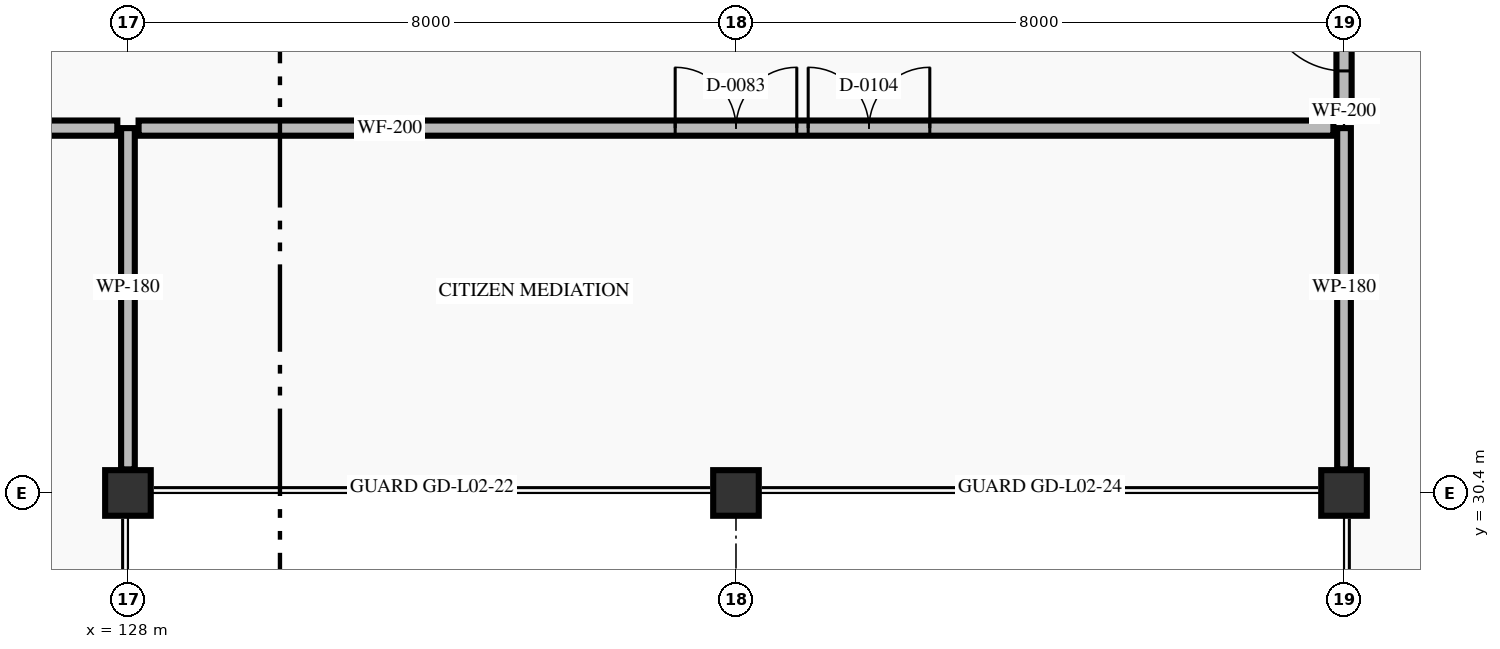
"""IFC4 building model, lengths in metres.
Left out: names, types, materials, properties, quantities, classifications, styles, units other than length and angle.
Written with IfcOpenShell. Run it as: python <this file> out.ifc"""

import sys

from ifc_helpers import new_model, si_unit, direction, frame, frame_2d, origin, origin_2d, place, context, subcontext, project, spatial, rectangle, extrude, element, fill, save


model = new_model("IFC4")
c1 = context("Model", 3, precision=1e-05, world=origin(), true_north=direction((0.0, 1.0)))
c2 = subcontext(c1, "Body", "Model", "MODEL_VIEW")
j1 = project(units=[si_unit("LENGTHUNIT", "METRE"), si_unit("PLANEANGLEUNIT", "RADIAN")], contexts=[c1])
p1 = place(None, origin())
s1 = spatial("IfcSite", under=j1, at=p1, CompositionType="ELEMENT")
p2 = place(p1, origin())
s2 = spatial("IfcBuilding", under=s1, at=p2, CompositionType="ELEMENT")
p3 = place(p2, frame((0.0, 0.0, 5.4)))
s3 = spatial("IfcBuildingStorey", under=s2, at=p3, CompositionType="ELEMENT", Elevation=5.4)
for number, where, z_axis, x_axis in (
    (1, (128.0, 30.4, 0.0), (0.0, 0.0, 1.0), (1.0, 0.0, 0.0)),
    (2, (136.0, 30.4, 0.0), (0.0, 0.0, 1.0), (1.0, 0.0, 0.0)),
    (3, (144.0, 30.4, 0.0), (0.0, 0.0, 1.0), (1.0, 0.0, 0.0)),
):
    element("IfcColumn", number, at=place(p3, frame(where, z_axis=z_axis, x_axis=x_axis)), inside=s3, PredefinedType="COLUMN", context=c2, shape_type="SweptSolid", body=[
        extrude(rectangle(XDim=0.6, YDim=0.6, at=origin_2d()), origin(), (0.0, 0.0, 1.0), 4.8),
    ])
for number, where, z_axis, x_axis in (
    (4, (128.0, 30.71, 0.0), (0.0, 0.0, 1.0), (0.0, 1.0, 0.0)),
    (5, (144.0, 35.2, 0.0), (0.0, 0.0, 1.0), (0.0, -1.0, 0.0)),
):
    element("IfcWall", number, at=place(p3, frame(where, z_axis=z_axis, x_axis=x_axis)), inside=s3, PredefinedType="PARTITIONING", context=c2, shape_type="SweptSolid", body=[
        extrude(rectangle(XDim=4.49, YDim=0.18, at=frame_2d((2.245, 0.0))), origin(), (0.0, 0.0, 1.0), 3.87),
    ])
p4 = place(p3, frame((128.14, 35.2, 0.0), z_axis=(0.0, 0.0, 1.0), x_axis=(1.0, 0.0, 0.0)))
e6 = element("IfcWall", 6, at=p4, inside=s3, PredefinedType="STANDARD", context=c2, shape_type="SweptSolid", body=[
    extrude(rectangle(XDim=15.72, YDim=0.2, at=frame_2d((7.86, 0.0))), origin(), (0.0, 0.0, 1.0), 4.45),
])
p5 = place(p4, frame((7.06, 0.0, 0.0)))
e7 = element("IfcOpeningElement", 7, at=p5, cuts=e6, PredefinedType="OPENING", context=c2, shape_type="SweptSolid", body=[
    extrude(rectangle(XDim=1.6, YDim=2.3, at=frame_2d((0.8, 1.15))), frame((0.0, 0.11, 0.0), z_axis=(0.0, -1.0, 0.0), x_axis=(1.0, 0.0, 0.0)), (0.0, 0.0, 1.0), 0.22),
])
p6 = place(p4, frame((8.81, 0.0, 0.0)))
e8 = element("IfcOpeningElement", 8, at=p6, cuts=e6, PredefinedType="OPENING", context=c2, shape_type="SweptSolid", body=[
    extrude(rectangle(XDim=1.6, YDim=2.3, at=frame_2d((0.8, 1.15))), frame((0.0, 0.11, 0.0), z_axis=(0.0, -1.0, 0.0), x_axis=(1.0, 0.0, 0.0)), (0.0, 0.0, 1.0), 0.22),
])
p7 = place(p3, frame((120.5, 35.2, 0.0), z_axis=(0.0, 0.0, 1.0), x_axis=(1.0, 0.0, 0.0)))
e9 = element("IfcWall", 9, at=p7, inside=s3, PredefinedType="STANDARD", context=c2, shape_type="SweptSolid", body=[
    extrude(rectangle(XDim=7.36, YDim=0.2, at=frame_2d((3.68, 0.0))), origin(), (0.0, 0.0, 1.0), 4.45),
])
p8 = place(p7, frame((4.655, 0.0, 0.0)))
e10 = element("IfcOpeningElement", 10, at=p8, cuts=e9, PredefinedType="OPENING", context=c2, shape_type="SweptSolid", body=[
    extrude(rectangle(XDim=1.05, YDim=2.15, at=frame_2d((0.525, 1.075))), frame((0.0, 0.11, 0.0), z_axis=(0.0, -1.0, 0.0), x_axis=(1.0, 0.0, 0.0)), (0.0, 0.0, 1.0), 0.22),
])
p9 = place(p3, frame((144.0, 35.34, 0.0), z_axis=(0.0, 0.0, 1.0), x_axis=(0.0, 1.0, 0.0)))
e11 = element("IfcWall", 11, at=p9, inside=s3, PredefinedType="STANDARD", context=c2, shape_type="SweptSolid", body=[
    extrude(rectangle(XDim=2.275, YDim=0.2, at=frame_2d((1.137, 0.0))), origin(), (0.0, 0.0, 1.0), 3.87),
])
p10 = place(p9, frame((0.613, 0.0, 0.0)))
e12 = element("IfcOpeningElement", 12, at=p10, cuts=e11, PredefinedType="OPENING", context=c2, shape_type="SweptSolid", body=[
    extrude(rectangle(XDim=1.05, YDim=2.15, at=frame_2d((0.525, 1.075))), frame((0.0, 0.11, 0.0), z_axis=(0.0, -1.0, 0.0), x_axis=(1.0, 0.0, 0.0)), (0.0, 0.0, 1.0), 0.22),
])
p11 = place(p5, origin())
e13 = element("IfcDoor", 13, at=p11, inside=s3, OperationType="DOUBLE_DOOR_SINGLE_SWING", PredefinedType="DOOR", context=c2, shape_type="SweptSolid", body=[
    extrude(rectangle(XDim=1.6, YDim=2.3, at=frame_2d((0.8, 1.15))), frame((0.0, 0.025, 0.0), z_axis=(0.0, -1.0, 0.0), x_axis=(1.0, 0.0, 0.0)), (0.0, 0.0, 1.0), 0.05),
])
fill(e7, e13)
p12 = place(p10, origin())
e14 = element("IfcDoor", 14, at=p12, inside=s3, OperationType="SINGLE_SWING_RIGHT", PredefinedType="DOOR", context=c2, shape_type="SweptSolid", body=[
    extrude(rectangle(XDim=1.05, YDim=2.15, at=frame_2d((0.525, 1.075))), frame((0.0, 0.025, 0.0), z_axis=(0.0, -1.0, 0.0), x_axis=(1.0, 0.0, 0.0)), (0.0, 0.0, 1.0), 0.05),
])
fill(e12, e14)
p13 = place(p6, origin())
e15 = element("IfcDoor", 15, at=p13, inside=s3, OperationType="DOUBLE_DOOR_SINGLE_SWING", PredefinedType="DOOR", context=c2, shape_type="SweptSolid", body=[
    extrude(rectangle(XDim=1.6, YDim=2.3, at=frame_2d((0.8, 1.15))), frame((0.0, 0.025, 0.0), z_axis=(0.0, -1.0, 0.0), x_axis=(1.0, 0.0, 0.0)), (0.0, 0.0, 1.0), 0.05),
])
fill(e8, e15)
save(model, sys.argv[1])
